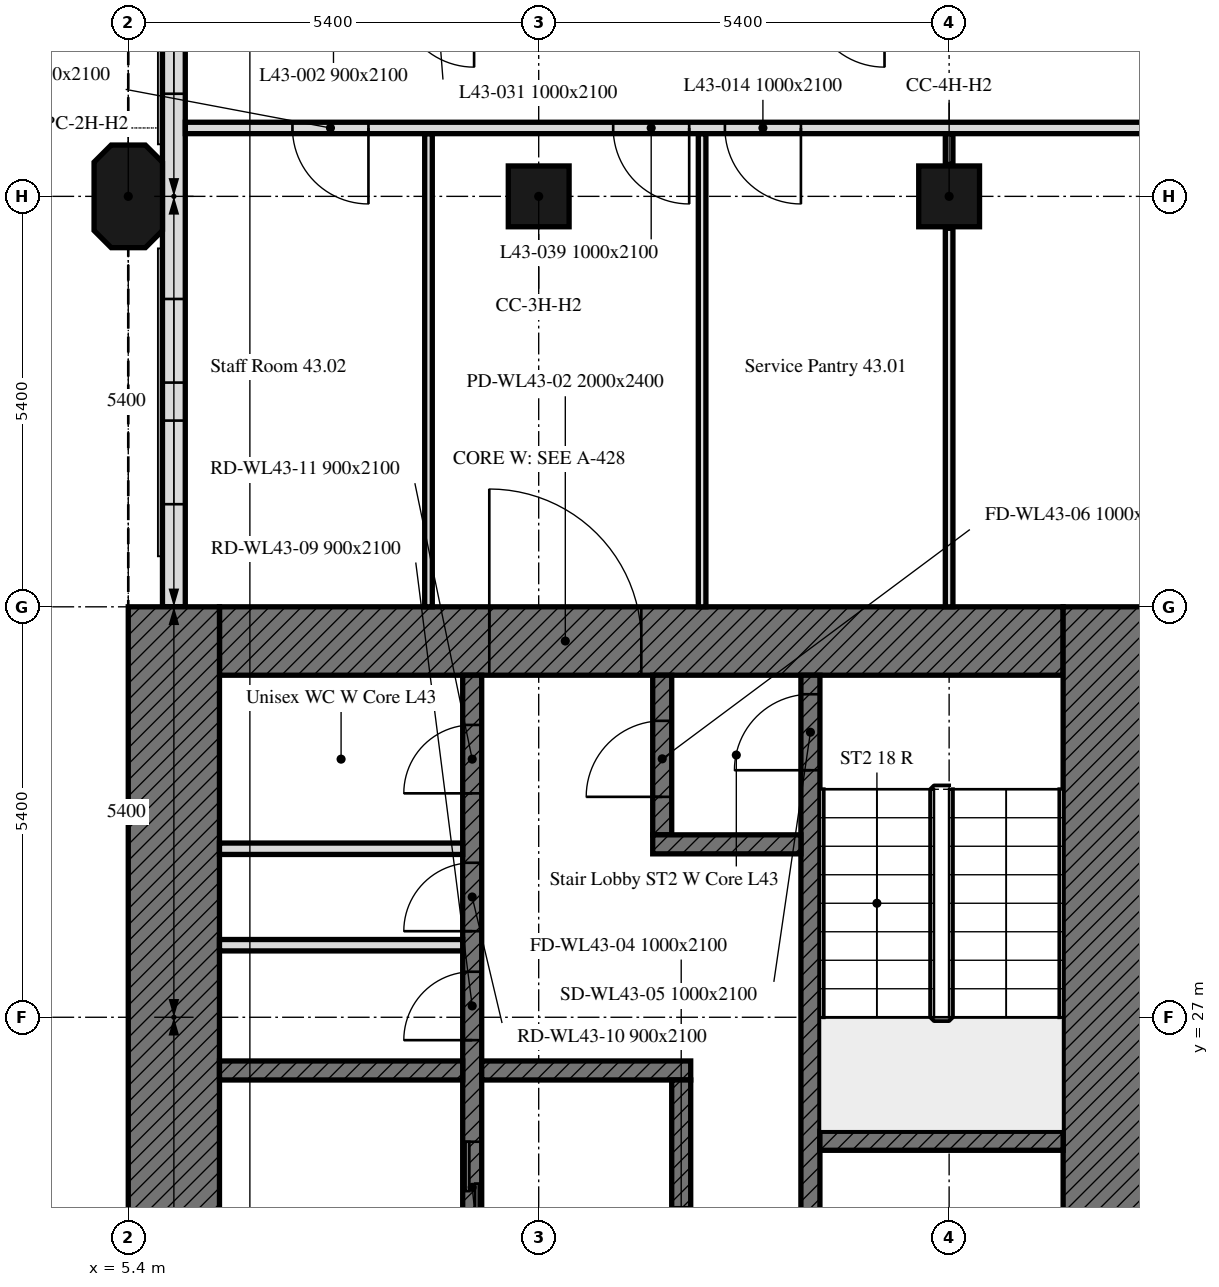
"""IFC4 building model, lengths in metres.
Left out: names, types, materials, properties, quantities, classifications, styles, units other than length and angle.
Written with IfcOpenShell. Run it as: python <this file> out.ifc"""

import sys

from ifc_helpers import new_model, si_unit, direction, frame, frame_2d, origin, origin_2d, place, context, subcontext, project, spatial, polyline, rectangle, outline, extrude, element, fill, save


model = new_model("IFC4")
c1 = context("Model", 3, precision=1e-05, world=origin(), true_north=direction((0.0, 1.0)))
c2 = subcontext(c1, "Body", "Model", "MODEL_VIEW")
j1 = project(units=[si_unit("LENGTHUNIT", "METRE"), si_unit("PLANEANGLEUNIT", "RADIAN")], contexts=[c1])
p1 = place(None, origin())
s1 = spatial("IfcSite", under=j1, at=p1, CompositionType="ELEMENT")
p2 = place(p1, origin())
s2 = spatial("IfcBuilding", under=s1, at=p2, CompositionType="ELEMENT")
p3 = place(p2, frame((0.0, 0.0, 180.7)))
s3 = spatial("IfcBuildingStorey", under=s2, at=p3, CompositionType="ELEMENT", Elevation=180.7)
p4 = place(p3, frame((5.4, 37.8, 0.0), z_axis=(0.0, 0.0, 1.0), x_axis=(0.0, 1.0, 0.0)))
e1 = element("IfcColumn", 1, at=p4, inside=s3, PredefinedType="COLUMN", context=c2, shape_type="SweptSolid", body=[
    extrude(outline(polyline([(-0.45, -0.45), (0.45, -0.45), (0.675, -0.225), (0.675, 0.225), (0.45, 0.45), (-0.45, 0.45), (-0.675, 0.225), (-0.675, -0.225), (-0.45, -0.45)])), origin(), (0.0, 0.0, 1.0), 3.0),
])
for number, where, z_axis, x_axis in (
    (2, (10.8, 37.8, 0.0), (0.0, 0.0, 1.0), (1.0, 0.0, 0.0)),
    (3, (16.2, 37.8, 0.0), (0.0, 0.0, 1.0), (1.0, 0.0, 0.0)),
):
    element("IfcColumn", number, at=place(p3, frame(where, z_axis=z_axis, x_axis=x_axis)), inside=s3, PredefinedType="COLUMN", context=c2, shape_type="SweptSolid", body=[
        extrude(rectangle(XDim=0.8, YDim=0.8, at=origin_2d()), origin(), (0.0, 0.0, 1.0), 3.0),
    ])
p5 = place(p3, frame((6.0, 43.014, 0.0), z_axis=(0.0, 0.0, 1.0), x_axis=(0.0, -1.0, 0.0)))
e4 = element("IfcWall", 4, at=p5, inside=s3, PredefinedType="SOLIDWALL", context=c2, shape_type="SweptSolid", body=[
    extrude(rectangle(XDim=10.614, YDim=0.3, at=frame_2d((5.307, 0.0))), origin(), (0.0, 0.0, 1.0), 3.0),
])
p6 = place(p5, frame((1.164, 0.0, 0.9)))
e5 = element("IfcOpeningElement", 5, at=p6, cuts=e4, PredefinedType="OPENING", context=c2, shape_type="SweptSolid", body=[
    extrude(rectangle(XDim=1.1, YDim=1.7, at=frame_2d((0.55, 0.85))), frame((0.0, 0.16, 0.0), z_axis=(0.0, -1.0, 0.0), x_axis=(1.0, 0.0, 0.0)), (0.0, 0.0, 1.0), 0.32),
])
p7 = place(p5, frame((2.764, 0.0, 0.9)))
e6 = element("IfcOpeningElement", 6, at=p7, cuts=e4, PredefinedType="OPENING", context=c2, shape_type="SweptSolid", body=[
    extrude(rectangle(XDim=1.1, YDim=1.7, at=frame_2d((0.55, 0.85))), frame((0.0, 0.16, 0.0), z_axis=(0.0, -1.0, 0.0), x_axis=(1.0, 0.0, 0.0)), (0.0, 0.0, 1.0), 0.32),
])
p8 = place(p5, frame((6.564, 0.0, 0.9)))
e7 = element("IfcOpeningElement", 7, at=p8, cuts=e4, PredefinedType="OPENING", context=c2, shape_type="SweptSolid", body=[
    extrude(rectangle(XDim=1.1, YDim=1.7, at=frame_2d((0.55, 0.85))), frame((0.0, 0.16, 0.0), z_axis=(0.0, -1.0, 0.0), x_axis=(1.0, 0.0, 0.0)), (0.0, 0.0, 1.0), 0.32),
])
p9 = place(p5, frame((8.164, 0.0, 0.9)))
e8 = element("IfcOpeningElement", 8, at=p9, cuts=e4, PredefinedType="OPENING", context=c2, shape_type="SweptSolid", body=[
    extrude(rectangle(XDim=1.1, YDim=1.7, at=frame_2d((0.55, 0.85))), frame((0.0, 0.16, 0.0), z_axis=(0.0, -1.0, 0.0), x_axis=(1.0, 0.0, 0.0)), (0.0, 0.0, 1.0), 0.32),
])
p10 = place(p3, frame((6.6, 31.95, 0.0), z_axis=(0.0, 0.0, 1.0), x_axis=(1.0, 0.0, 0.0)))
e9 = element("IfcWall", 9, at=p10, inside=s3, PredefinedType="SOLIDWALL", context=c2, shape_type="SweptSolid", body=[
    extrude(rectangle(XDim=11.1, YDim=0.9, at=frame_2d((5.55, 0.0))), origin(), (0.0, 0.0, 1.0), 3.0),
])
p11 = place(p10, frame((3.55, 0.0, 0.0)))
e10 = element("IfcOpeningElement", 10, at=p11, cuts=e9, PredefinedType="OPENING", context=c2, shape_type="SweptSolid", body=[
    extrude(rectangle(XDim=2.0, YDim=2.4, at=frame_2d((1.0, 1.2))), frame((0.0, 0.45, 0.0), z_axis=(0.0, -1.0, 0.0), x_axis=(1.0, 0.0, 0.0)), (0.0, 0.0, 1.0), 0.9),
])
for number, where, z_axis, x_axis in (
    (11, (6.0, 16.2, 0.0), (0.0, 0.0, 1.0), (0.0, 1.0, 0.0)),
    (12, (18.3, 32.4, 0.0), (0.0, 0.0, 1.0), (0.0, -1.0, 0.0)),
):
    element("IfcWall", number, at=place(p3, frame(where, z_axis=z_axis, x_axis=x_axis)), inside=s3, PredefinedType="SOLIDWALL", context=c2, shape_type="SweptSolid", body=[
        extrude(rectangle(XDim=16.2, YDim=1.2, at=frame_2d((8.1, 0.0))), origin(), (0.0, 0.0, 1.0), 3.0),
    ])
p12 = place(p3, frame((9.925, 17.1, 0.0), z_axis=(0.0, 0.0, 1.0), x_axis=(0.0, 1.0, 0.0)))
e13 = element("IfcWall", 13, at=p12, inside=s3, PredefinedType="SOLIDWALL", context=c2, shape_type="SweptSolid", body=[
    extrude(rectangle(XDim=14.4, YDim=0.25, at=frame_2d((7.2, 0.0))), origin(), (0.0, 0.0, 1.0), 3.0),
])
p13 = place(p12, frame((4.6, 0.0, 0.0)))
e14 = element("IfcOpeningElement", 14, at=p13, cuts=e13, PredefinedType="OPENING", context=c2, shape_type="SweptSolid", body=[
    extrude(rectangle(XDim=1.0, YDim=2.1, at=frame_2d((0.5, 1.05))), frame((0.0, 0.125, 0.0), z_axis=(0.0, -1.0, 0.0), x_axis=(1.0, 0.0, 0.0)), (0.0, 0.0, 1.0), 0.25),
])
p14 = place(p12, frame((7.062, 0.0, 0.0)))
e15 = element("IfcOpeningElement", 15, at=p14, cuts=e13, PredefinedType="OPENING", context=c2, shape_type="SweptSolid", body=[
    extrude(rectangle(XDim=1.2, YDim=2.1, at=frame_2d((0.6, 1.05))), frame((0.0, 0.125, 0.0), z_axis=(0.0, -1.0, 0.0), x_axis=(1.0, 0.0, 0.0)), (0.0, 0.0, 1.0), 0.25),
])
p15 = place(p12, frame((9.599, 0.0, 0.0)))
e16 = element("IfcOpeningElement", 16, at=p15, cuts=e13, PredefinedType="OPENING", context=c2, shape_type="SweptSolid", body=[
    extrude(rectangle(XDim=0.9, YDim=2.1, at=frame_2d((0.45, 1.05))), frame((0.0, 0.125, 0.0), z_axis=(0.0, -1.0, 0.0), x_axis=(1.0, 0.0, 0.0)), (0.0, 0.0, 1.0), 0.25),
])
p16 = place(p12, frame((11.032, 0.0, 0.0)))
e17 = element("IfcOpeningElement", 17, at=p16, cuts=e13, PredefinedType="OPENING", context=c2, shape_type="SweptSolid", body=[
    extrude(rectangle(XDim=0.9, YDim=2.1, at=frame_2d((0.45, 1.05))), frame((0.0, 0.125, 0.0), z_axis=(0.0, -1.0, 0.0), x_axis=(1.0, 0.0, 0.0)), (0.0, 0.0, 1.0), 0.25),
])
p17 = place(p12, frame((12.846, 0.0, 0.0)))
e18 = element("IfcOpeningElement", 18, at=p17, cuts=e13, PredefinedType="OPENING", context=c2, shape_type="SweptSolid", body=[
    extrude(rectangle(XDim=0.9, YDim=2.1, at=frame_2d((0.45, 1.05))), frame((0.0, 0.125, 0.0), z_axis=(0.0, -1.0, 0.0), x_axis=(1.0, 0.0, 0.0)), (0.0, 0.0, 1.0), 0.25),
])
p18 = place(p3, frame((14.375, 17.1, 0.0), z_axis=(0.0, 0.0, 1.0), x_axis=(0.0, 1.0, 0.0)))
e19 = element("IfcWall", 19, at=p18, inside=s3, PredefinedType="SOLIDWALL", context=c2, shape_type="SweptSolid", body=[
    extrude(rectangle(XDim=14.4, YDim=0.25, at=frame_2d((7.2, 0.0))), origin(), (0.0, 0.0, 1.0), 3.0),
])
p19 = place(p18, frame((13.15, 0.0, 0.0)))
e20 = element("IfcOpeningElement", 20, at=p19, cuts=e19, PredefinedType="OPENING", context=c2, shape_type="SweptSolid", body=[
    extrude(rectangle(XDim=1.0, YDim=2.1, at=frame_2d((0.5, 1.05))), frame((0.0, 0.125, 0.0), z_axis=(0.0, -1.0, 0.0), x_axis=(1.0, 0.0, 0.0)), (0.0, 0.0, 1.0), 0.25),
])
p20 = place(p18, frame((0.6, 0.0, 0.0)))
e21 = element("IfcOpeningElement", 21, at=p20, cuts=e19, PredefinedType="OPENING", context=c2, shape_type="SweptSolid", body=[
    extrude(rectangle(XDim=1.1, YDim=2.1, at=frame_2d((0.55, 1.05))), frame((0.0, 0.125, 0.0), z_axis=(0.0, -1.0, 0.0), x_axis=(1.0, 0.0, 0.0)), (0.0, 0.0, 1.0), 0.25),
])
p21 = place(p18, frame((3.25, 0.0, 0.0)))
e22 = element("IfcOpeningElement", 22, at=p21, cuts=e19, PredefinedType="OPENING", context=c2, shape_type="SweptSolid", body=[
    extrude(rectangle(XDim=0.9, YDim=2.1, at=frame_2d((0.45, 1.05))), frame((0.0, 0.125, 0.0), z_axis=(0.0, -1.0, 0.0), x_axis=(1.0, 0.0, 0.0)), (0.0, 0.0, 1.0), 0.25),
])
for number, where, z_axis, x_axis in (
    (23, (14.5, 25.375, 0.0), (0.0, 0.0, 1.0), (1.0, 0.0, 0.0)),
    (24, (6.6, 26.3, 0.0), (0.0, 0.0, 1.0), (1.0, 0.0, 0.0)),
):
    element("IfcWall", number, at=place(p3, frame(where, z_axis=z_axis, x_axis=x_axis)), inside=s3, PredefinedType="SOLIDWALL", context=c2, shape_type="SweptSolid", body=[
        extrude(rectangle(XDim=3.2, YDim=0.25, at=frame_2d((1.6, 0.0))), origin(), (0.0, 0.0, 1.0), 3.0),
    ])
p22 = place(p3, frame((10.05, 26.3, 0.0), z_axis=(0.0, 0.0, 1.0), x_axis=(1.0, 0.0, 0.0)))
e25 = element("IfcWall", 25, at=p22, inside=s3, PredefinedType="SOLIDWALL", context=c2, shape_type="SweptSolid", body=[
    extrude(rectangle(XDim=2.75, YDim=0.25, at=frame_2d((1.375, 0.0))), origin(), (0.0, 0.0, 1.0), 3.0),
])
p23 = place(p3, frame((12.425, 29.4, 0.0), z_axis=(0.0, 0.0, 1.0), x_axis=(0.0, 1.0, 0.0)))
e26 = element("IfcWall", 26, at=p23, inside=s3, PredefinedType="SOLIDWALL", context=c2, shape_type="SweptSolid", body=[
    extrude(rectangle(XDim=2.1, YDim=0.25, at=frame_2d((1.05, 0.0))), origin(), (0.0, 0.0, 1.0), 3.0),
])
p24 = place(p23, frame((0.5, 0.0, 0.0)))
e27 = element("IfcOpeningElement", 27, at=p24, cuts=e26, PredefinedType="OPENING", context=c2, shape_type="SweptSolid", body=[
    extrude(rectangle(XDim=1.0, YDim=2.1, at=frame_2d((0.5, 1.05))), frame((0.0, 0.125, 0.0), z_axis=(0.0, -1.0, 0.0), x_axis=(1.0, 0.0, 0.0)), (0.0, 0.0, 1.0), 0.25),
])
p25 = place(p3, frame((12.3, 29.275, 0.0), z_axis=(0.0, 0.0, 1.0), x_axis=(1.0, 0.0, 0.0)))
e28 = element("IfcWall", 28, at=p25, inside=s3, PredefinedType="SOLIDWALL", context=c2, shape_type="SweptSolid", body=[
    extrude(rectangle(XDim=1.95, YDim=0.25, at=frame_2d((0.975, 0.0))), origin(), (0.0, 0.0, 1.0), 3.0),
])
p26 = place(p3, frame((12.675, 20.55, 0.0), z_axis=(0.0, 0.0, 1.0), x_axis=(0.0, 1.0, 0.0)))
e29 = element("IfcWall", 29, at=p26, inside=s3, PredefinedType="SOLIDWALL", context=c2, shape_type="SweptSolid", body=[
    extrude(rectangle(XDim=5.625, YDim=0.25, at=frame_2d((2.812, 0.0))), origin(), (0.0, 0.0, 1.0), 3.0),
])
p27 = place(p26, frame((2.95, 0.0, 0.0)))
e30 = element("IfcOpeningElement", 30, at=p27, cuts=e29, PredefinedType="OPENING", context=c2, shape_type="SweptSolid", body=[
    extrude(rectangle(XDim=1.0, YDim=2.1, at=frame_2d((0.5, 1.05))), frame((0.0, 0.125, 0.0), z_axis=(0.0, -1.0, 0.0), x_axis=(1.0, 0.0, 0.0)), (0.0, 0.0, 1.0), 0.25),
])
for number, where, z_axis, x_axis in (
    (31, (6.6, 27.948, 0.0), (0.0, 0.0, 1.0), (1.0, 0.0, 0.0)),
    (32, (6.6, 29.217, 0.0), (0.0, 0.0, 1.0), (1.0, 0.0, 0.0)),
):
    element("IfcWall", number, at=place(p3, frame(where, z_axis=z_axis, x_axis=x_axis)), inside=s3, PredefinedType="PARTITIONING", context=c2, shape_type="SweptSolid", body=[
        extrude(rectangle(XDim=3.2, YDim=0.15, at=frame_2d((1.6, 0.0))), origin(), (0.0, 0.0, 1.0), 3.0),
    ])
p28 = place(p3, frame((16.2, 38.625, 0.0), z_axis=(0.0, 0.0, 1.0), x_axis=(0.0, -1.0, 0.0)))
e33 = element("IfcWall", 33, at=p28, inside=s3, PredefinedType="PARTITIONING", context=c2, shape_type="SweptSolid", body=[
    extrude(rectangle(XDim=0.405, YDim=0.1, at=frame_2d((0.203, 0.0))), origin(), (0.0, 0.0, 1.0), 2.4),
])
p29 = place(p3, frame((16.2, 37.38, 0.0), z_axis=(0.0, 0.0, 1.0), x_axis=(0.0, -1.0, 0.0)))
e34 = element("IfcWall", 34, at=p29, inside=s3, PredefinedType="PARTITIONING", context=c2, shape_type="SweptSolid", body=[
    extrude(rectangle(XDim=4.98, YDim=0.1, at=frame_2d((2.49, 0.0))), origin(), (0.0, 0.0, 1.0), 2.4),
])
for number, where, z_axis, x_axis in (
    (35, (12.95, 32.4, 0.0), (0.0, 0.0, 1.0), (0.0, 1.0, 0.0)),
    (36, (9.35, 38.625, 0.0), (0.0, 0.0, 1.0), (0.0, -1.0, 0.0)),
):
    element("IfcWall", number, at=place(p3, frame(where, z_axis=z_axis, x_axis=x_axis)), inside=s3, PredefinedType="PARTITIONING", context=c2, shape_type="SweptSolid", body=[
        extrude(rectangle(XDim=6.225, YDim=0.1, at=frame_2d((3.113, 0.0))), origin(), (0.0, 0.0, 1.0), 3.0),
    ])
p30 = place(p3, frame((43.275, 38.7, 0.0), z_axis=(0.0, 0.0, 1.0), x_axis=(-1.0, 0.0, 0.0)))
e37 = element("IfcWall", 37, at=p30, inside=s3, PredefinedType="PARTITIONING", context=c2, shape_type="SweptSolid", body=[
    extrude(rectangle(XDim=37.124, YDim=0.15, at=frame_2d((18.562, 0.0))), origin(), (0.0, 0.0, 1.0), 2.4),
])
p31 = place(p30, frame((18.475, 0.0, 0.0)))
e38 = element("IfcOpeningElement", 38, at=p31, cuts=e37, PredefinedType="OPENING", context=c2, shape_type="SweptSolid", body=[
    extrude(rectangle(XDim=1.0, YDim=2.1, at=frame_2d((0.5, 1.05))), frame((0.0, 0.075, 0.0), z_axis=(0.0, -1.0, 0.0), x_axis=(1.0, 0.0, 0.0)), (0.0, 0.0, 1.0), 0.15),
])
p32 = place(p30, frame((34.715, 0.0, 0.0)))
e39 = element("IfcOpeningElement", 39, at=p32, cuts=e37, PredefinedType="OPENING", context=c2, shape_type="SweptSolid", body=[
    extrude(rectangle(XDim=1.0, YDim=2.1, at=frame_2d((0.5, 1.05))), frame((0.0, 0.075, 0.0), z_axis=(0.0, -1.0, 0.0), x_axis=(1.0, 0.0, 0.0)), (0.0, 0.0, 1.0), 0.15),
])
p33 = place(p30, frame((7.925, 0.0, 0.0)))
e40 = element("IfcOpeningElement", 40, at=p33, cuts=e37, PredefinedType="OPENING", context=c2, shape_type="SweptSolid", body=[
    extrude(rectangle(XDim=1.0, YDim=2.1, at=frame_2d((0.5, 1.05))), frame((0.0, 0.075, 0.0), z_axis=(0.0, -1.0, 0.0), x_axis=(1.0, 0.0, 0.0)), (0.0, 0.0, 1.0), 0.15),
])
p34 = place(p30, frame((29.025, 0.0, 0.0)))
e41 = element("IfcOpeningElement", 41, at=p34, cuts=e37, PredefinedType="OPENING", context=c2, shape_type="SweptSolid", body=[
    extrude(rectangle(XDim=1.0, YDim=2.1, at=frame_2d((0.5, 1.05))), frame((0.0, 0.075, 0.0), z_axis=(0.0, -1.0, 0.0), x_axis=(1.0, 0.0, 0.0)), (0.0, 0.0, 1.0), 0.15),
])
p35 = place(p30, frame((30.495, 0.0, 0.0)))
e42 = element("IfcOpeningElement", 42, at=p35, cuts=e37, PredefinedType="OPENING", context=c2, shape_type="SweptSolid", body=[
    extrude(rectangle(XDim=1.0, YDim=2.1, at=frame_2d((0.5, 1.05))), frame((0.0, 0.075, 0.0), z_axis=(0.0, -1.0, 0.0), x_axis=(1.0, 0.0, 0.0)), (0.0, 0.0, 1.0), 0.15),
])
p36 = place(p30, frame((6.455, 0.0, 0.0)))
e43 = element("IfcOpeningElement", 43, at=p36, cuts=e37, PredefinedType="OPENING", context=c2, shape_type="SweptSolid", body=[
    extrude(rectangle(XDim=1.0, YDim=2.1, at=frame_2d((0.5, 1.05))), frame((0.0, 0.075, 0.0), z_axis=(0.0, -1.0, 0.0), x_axis=(1.0, 0.0, 0.0)), (0.0, 0.0, 1.0), 0.15),
])
p37 = place(p7, origin())
e44 = element("IfcWindow", 44, at=p37, inside=s3, PartitioningType="SINGLE_PANEL", PredefinedType="WINDOW", context=c2, shape_type="SweptSolid", body=[
    extrude(rectangle(XDim=1.1, YDim=1.7, at=frame_2d((0.55, 0.85))), frame((0.0, 0.03, 0.0), z_axis=(0.0, -1.0, 0.0), x_axis=(1.0, 0.0, 0.0)), (0.0, 0.0, 1.0), 0.06),
])
fill(e6, e44)
p38 = place(p8, origin())
e45 = element("IfcWindow", 45, at=p38, inside=s3, PartitioningType="SINGLE_PANEL", PredefinedType="WINDOW", context=c2, shape_type="SweptSolid", body=[
    extrude(rectangle(XDim=1.1, YDim=1.7, at=frame_2d((0.55, 0.85))), frame((0.0, 0.03, 0.0), z_axis=(0.0, -1.0, 0.0), x_axis=(1.0, 0.0, 0.0)), (0.0, 0.0, 1.0), 0.06),
])
fill(e7, e45)
p39 = place(p9, origin())
e46 = element("IfcWindow", 46, at=p39, inside=s3, PartitioningType="SINGLE_PANEL", PredefinedType="WINDOW", context=c2, shape_type="SweptSolid", body=[
    extrude(rectangle(XDim=1.1, YDim=1.7, at=frame_2d((0.55, 0.85))), frame((0.0, 0.03, 0.0), z_axis=(0.0, -1.0, 0.0), x_axis=(1.0, 0.0, 0.0)), (0.0, 0.0, 1.0), 0.06),
])
fill(e8, e46)
p40 = place(p11, origin())
e47 = element("IfcDoor", 47, at=p40, inside=s3, OperationType="DOUBLE_DOOR_SINGLE_SWING", PredefinedType="DOOR", context=c2, shape_type="SweptSolid", body=[
    extrude(rectangle(XDim=2.0, YDim=2.4, at=frame_2d((1.0, 1.2))), frame((0.0, 0.025, 0.0), z_axis=(0.0, -1.0, 0.0), x_axis=(1.0, 0.0, 0.0)), (0.0, 0.0, 1.0), 0.05),
])
fill(e10, e47)
p41 = place(p19, origin())
e48 = element("IfcDoor", 48, at=p41, inside=s3, OperationType="SINGLE_SWING_LEFT", PredefinedType="DOOR", context=c2, shape_type="SweptSolid", body=[
    extrude(rectangle(XDim=1.0, YDim=2.1, at=frame_2d((0.5, 1.05))), frame((0.0, 0.025, 0.0), z_axis=(0.0, -1.0, 0.0), x_axis=(1.0, 0.0, 0.0)), (0.0, 0.0, 1.0), 0.05),
])
fill(e20, e48)
p42 = place(p24, origin())
e49 = element("IfcDoor", 49, at=p42, inside=s3, OperationType="SINGLE_SWING_LEFT", PredefinedType="DOOR", context=c2, shape_type="SweptSolid", body=[
    extrude(rectangle(XDim=1.0, YDim=2.1, at=frame_2d((0.5, 1.05))), frame((0.0, 0.025, 0.0), z_axis=(0.0, -1.0, 0.0), x_axis=(1.0, 0.0, 0.0)), (0.0, 0.0, 1.0), 0.05),
])
fill(e27, e49)
p43 = place(p14, origin())
e50 = element("IfcDoor", 50, at=p43, inside=s3, OperationType="DOUBLE_DOOR_SLIDING", PredefinedType="DOOR", context=c2, shape_type="SweptSolid", body=[
    extrude(rectangle(XDim=1.2, YDim=2.1, at=frame_2d((0.6, 1.05))), frame((0.0, 0.025, 0.0), z_axis=(0.0, -1.0, 0.0), x_axis=(1.0, 0.0, 0.0)), (0.0, 0.0, 1.0), 0.05),
])
fill(e15, e50)
p44 = place(p15, origin())
e51 = element("IfcDoor", 51, at=p44, inside=s3, OperationType="SINGLE_SWING_LEFT", PredefinedType="DOOR", context=c2, shape_type="SweptSolid", body=[
    extrude(rectangle(XDim=0.9, YDim=2.1, at=frame_2d((0.45, 1.05))), frame((0.0, 0.025, 0.0), z_axis=(0.0, -1.0, 0.0), x_axis=(1.0, 0.0, 0.0)), (0.0, 0.0, 1.0), 0.05),
])
fill(e16, e51)
p45 = place(p16, origin())
e52 = element("IfcDoor", 52, at=p45, inside=s3, OperationType="SINGLE_SWING_LEFT", PredefinedType="DOOR", context=c2, shape_type="SweptSolid", body=[
    extrude(rectangle(XDim=0.9, YDim=2.1, at=frame_2d((0.45, 1.05))), frame((0.0, 0.025, 0.0), z_axis=(0.0, -1.0, 0.0), x_axis=(1.0, 0.0, 0.0)), (0.0, 0.0, 1.0), 0.05),
])
fill(e17, e52)
p46 = place(p17, origin())
e53 = element("IfcDoor", 53, at=p46, inside=s3, OperationType="SINGLE_SWING_LEFT", PredefinedType="DOOR", context=c2, shape_type="SweptSolid", body=[
    extrude(rectangle(XDim=0.9, YDim=2.1, at=frame_2d((0.45, 1.05))), frame((0.0, 0.025, 0.0), z_axis=(0.0, -1.0, 0.0), x_axis=(1.0, 0.0, 0.0)), (0.0, 0.0, 1.0), 0.05),
])
fill(e18, e53)
p47 = place(p32, origin())
e54 = element("IfcDoor", 54, at=p47, inside=s3, OperationType="SINGLE_SWING_LEFT", PredefinedType="DOOR", context=c2, shape_type="SweptSolid", body=[
    extrude(rectangle(XDim=1.0, YDim=2.1, at=frame_2d((0.5, 1.05))), frame((0.0, 0.025, 0.0), z_axis=(0.0, -1.0, 0.0), x_axis=(1.0, 0.0, 0.0)), (0.0, 0.0, 1.0), 0.05),
])
fill(e39, e54)
p48 = place(p34, origin())
e55 = element("IfcDoor", 55, at=p48, inside=s3, OperationType="SINGLE_SWING_RIGHT", PredefinedType="DOOR", context=c2, shape_type="SweptSolid", body=[
    extrude(rectangle(XDim=1.0, YDim=2.1, at=frame_2d((0.5, 1.05))), frame((0.0, 0.025, 0.0), z_axis=(0.0, -1.0, 0.0), x_axis=(1.0, 0.0, 0.0)), (0.0, 0.0, 1.0), 0.05),
])
fill(e41, e55)
p49 = place(p35, origin())
e56 = element("IfcDoor", 56, at=p49, inside=s3, OperationType="SINGLE_SWING_LEFT", PredefinedType="DOOR", context=c2, shape_type="SweptSolid", body=[
    extrude(rectangle(XDim=1.0, YDim=2.1, at=frame_2d((0.5, 1.05))), frame((0.0, 0.025, 0.0), z_axis=(0.0, -1.0, 0.0), x_axis=(1.0, 0.0, 0.0)), (0.0, 0.0, 1.0), 0.05),
])
fill(e42, e56)
save(model, sys.argv[1])
